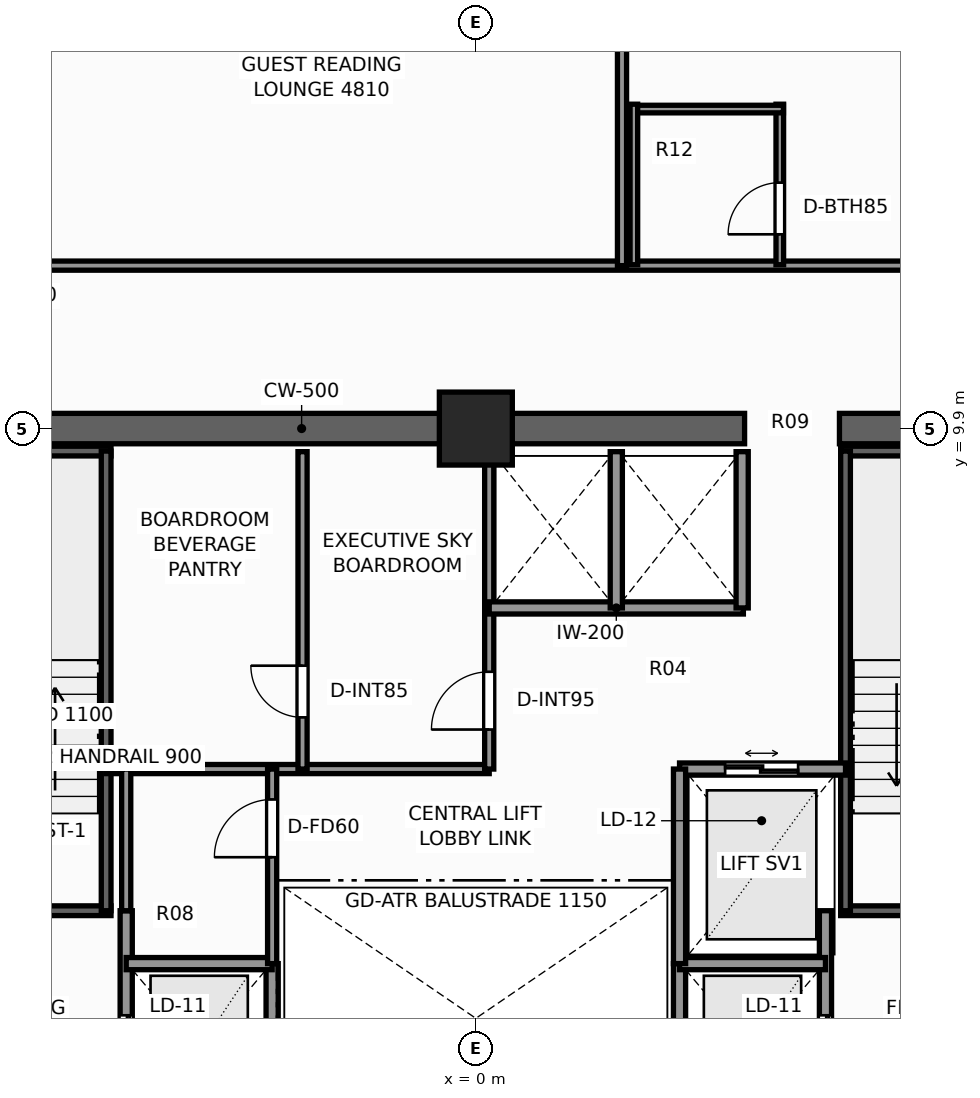
"""IFC4 building model, lengths in metres.
Left out: names, types, materials, properties, quantities, classifications, styles, units other than length and angle.
Written with IfcOpenShell. Run it as: python <this file> out.ifc"""

import sys

from ifc_helpers import new_model, si_unit, direction, frame, frame_2d, origin, origin_2d, place, context, subcontext, project, spatial, rectangle, extrude, element, fill, save


model = new_model("IFC4")
c1 = context("Model", 3, precision=1e-05, world=origin(), true_north=direction((0.0, 1.0)))
c2 = subcontext(c1, "Body", "Model", "MODEL_VIEW")
j1 = project(units=[si_unit("LENGTHUNIT", "METRE"), si_unit("PLANEANGLEUNIT", "RADIAN")], contexts=[c1])
p1 = place(None, origin())
s1 = spatial("IfcSite", under=j1, at=p1, CompositionType="ELEMENT")
p2 = place(p1, origin())
s2 = spatial("IfcBuilding", under=s1, at=p2, CompositionType="ELEMENT")
p3 = place(p2, frame((0.0, 0.0, 166.8)))
s3 = spatial("IfcBuildingStorey", under=s2, at=p3, CompositionType="ELEMENT", Elevation=166.8)
p4 = place(p3, frame((-10.15, 9.9, 0.0), z_axis=(0.0, 0.0, 1.0), x_axis=(1.0, 0.0, 0.0)))
e1 = element("IfcWall", 1, at=p4, inside=s3, PredefinedType="SHEAR", context=c2, shape_type="SweptSolid", body=[
    extrude(rectangle(XDim=14.57, YDim=0.5, at=frame_2d((7.285, 0.0))), origin(), (0.0, 0.0, 1.0), 3.3),
])
p5 = place(p3, frame((5.98, 9.9, 0.0), z_axis=(0.0, 0.0, 1.0), x_axis=(1.0, 0.0, 0.0)))
e2 = element("IfcWall", 2, at=p5, inside=s3, PredefinedType="SHEAR", context=c2, shape_type="SweptSolid", body=[
    extrude(rectangle(XDim=4.17, YDim=0.5, at=frame_2d((2.085, 0.0))), origin(), (0.0, 0.0, 1.0), 3.3),
])
p6 = place(p3, frame((0.0, 9.9, 0.0), z_axis=(0.0, 0.0, 1.0), x_axis=(1.0, 0.0, 0.0)))
e3 = element("IfcColumn", 3, at=p6, inside=s3, PredefinedType="COLUMN", context=c2, shape_type="SweptSolid", body=[
    extrude(rectangle(XDim=1.2, YDim=1.2, at=origin_2d()), origin(), (0.0, 0.0, 1.0), 3.3),
])
p7 = place(p3, frame((-9.52, 1.97, 0.0), z_axis=(0.0, 0.0, 1.0), x_axis=(1.0, 0.0, 0.0)))
e4 = element("IfcWall", 4, at=p7, inside=s3, PredefinedType="SHEAR", context=c2, shape_type="SweptSolid", body=[
    extrude(rectangle(XDim=3.52, YDim=0.16, at=frame_2d((1.76, 0.0))), origin(), (0.0, 0.0, 1.0), 3.3),
])
p8 = place(p7, frame((1.15, 0.0, 0.0)))
e5 = element("IfcOpeningElement", 5, at=p8, cuts=e4, PredefinedType="OPENING", context=c2, shape_type="SweptSolid", body=[
    extrude(rectangle(XDim=1.1, YDim=2.2, at=frame_2d((0.55, 1.1))), frame((0.0, 0.09, 0.0), z_axis=(0.0, -1.0, 0.0), x_axis=(1.0, 0.0, 0.0)), (0.0, 0.0, 1.0), 0.18),
])
p9 = place(p3, frame((-9.52, 9.53, 0.0), z_axis=(0.0, 0.0, 1.0), x_axis=(1.0, 0.0, 0.0)))
e6 = element("IfcWall", 6, at=p9, inside=s3, PredefinedType="SHEAR", context=c2, shape_type="SweptSolid", body=[
    extrude(rectangle(XDim=3.52, YDim=0.16, at=frame_2d((1.76, 0.0))), origin(), (0.0, 0.0, 1.0), 3.3),
])
p10 = place(p3, frame((-6.08, 1.97, 0.0), z_axis=(0.0, 0.0, 1.0), x_axis=(0.0, 1.0, 0.0)))
e7 = element("IfcWall", 7, at=p10, inside=s3, PredefinedType="SHEAR", context=c2, shape_type="SweptSolid", body=[
    extrude(rectangle(XDim=7.56, YDim=0.16, at=frame_2d((3.78, 0.0))), origin(), (0.0, 0.0, 1.0), 3.3),
])
p11 = place(p3, frame((6.0, 1.97, 0.0), z_axis=(0.0, 0.0, 1.0), x_axis=(1.0, 0.0, 0.0)))
e8 = element("IfcWall", 8, at=p11, inside=s3, PredefinedType="SHEAR", context=c2, shape_type="SweptSolid", body=[
    extrude(rectangle(XDim=3.52, YDim=0.16, at=frame_2d((1.76, 0.0))), origin(), (0.0, 0.0, 1.0), 3.3),
])
p12 = place(p11, frame((1.15, 0.0, 0.0)))
e9 = element("IfcOpeningElement", 9, at=p12, cuts=e8, PredefinedType="OPENING", context=c2, shape_type="SweptSolid", body=[
    extrude(rectangle(XDim=1.1, YDim=2.2, at=frame_2d((0.55, 1.1))), frame((0.0, 0.09, 0.0), z_axis=(0.0, -1.0, 0.0), x_axis=(1.0, 0.0, 0.0)), (0.0, 0.0, 1.0), 0.18),
])
p13 = place(p3, frame((6.0, 9.53, 0.0), z_axis=(0.0, 0.0, 1.0), x_axis=(1.0, 0.0, 0.0)))
e10 = element("IfcWall", 10, at=p13, inside=s3, PredefinedType="SHEAR", context=c2, shape_type="SweptSolid", body=[
    extrude(rectangle(XDim=3.52, YDim=0.16, at=frame_2d((1.76, 0.0))), origin(), (0.0, 0.0, 1.0), 3.3),
])
p14 = place(p3, frame((6.08, 1.97, 0.0), z_axis=(0.0, 0.0, 1.0), x_axis=(0.0, 1.0, 0.0)))
e11 = element("IfcWall", 11, at=p14, inside=s3, PredefinedType="SHEAR", context=c2, shape_type="SweptSolid", body=[
    extrude(rectangle(XDim=7.56, YDim=0.16, at=frame_2d((3.78, 0.0))), origin(), (0.0, 0.0, 1.0), 3.3),
])
p15 = place(p3, frame((-5.75, -3.6, 0.0), z_axis=(0.0, 0.0, 1.0), x_axis=(0.0, 1.0, 0.0)))
e12 = element("IfcWall", 12, at=p15, inside=s3, PredefinedType="SOLIDWALL", context=c2, shape_type="SweptSolid", body=[
    extrude(rectangle(XDim=5.57, YDim=0.2, at=frame_2d((2.785, 0.0))), origin(), (0.0, 0.0, 1.0), 2.735),
])
p16 = place(p15, frame((2.75, 0.0, 0.0)))
e13 = element("IfcOpeningElement", 13, at=p16, cuts=e12, PredefinedType="OPENING", context=c2, shape_type="SweptSolid", body=[
    extrude(rectangle(XDim=1.1, YDim=2.2, at=frame_2d((0.55, 1.1))), frame((0.0, 0.11, 0.0), z_axis=(0.0, -1.0, 0.0), x_axis=(1.0, 0.0, 0.0)), (0.0, 0.0, 1.0), 0.22),
])
p17 = place(p3, frame((-3.35, -1.7, 0.0), z_axis=(0.0, 0.0, 1.0), x_axis=(0.0, 1.0, 0.0)))
e14 = element("IfcWall", 14, at=p17, inside=s3, PredefinedType="SOLIDWALL", context=c2, shape_type="SweptSolid", body=[
    extrude(rectangle(XDim=2.8, YDim=0.2, at=frame_2d((1.4, 0.0))), origin(), (0.0, 0.0, 1.0), 2.735),
])
p18 = place(p3, frame((-5.75, 1.1, 0.0), z_axis=(0.0, 0.0, 1.0), x_axis=(1.0, 0.0, 0.0)))
e15 = element("IfcWall", 15, at=p18, inside=s3, PredefinedType="SOLIDWALL", context=c2, shape_type="SweptSolid", body=[
    extrude(rectangle(XDim=2.4, YDim=0.2, at=frame_2d((1.2, 0.0))), origin(), (0.0, 0.0, 1.0), 3.1),
])
p19 = place(p3, frame((5.75, -3.6, 0.0), z_axis=(0.0, 0.0, 1.0), x_axis=(0.0, 1.0, 0.0)))
e16 = element("IfcWall", 16, at=p19, inside=s3, PredefinedType="SOLIDWALL", context=c2, shape_type="SweptSolid", body=[
    extrude(rectangle(XDim=5.57, YDim=0.2, at=frame_2d((2.785, 0.0))), origin(), (0.0, 0.0, 1.0), 2.735),
])
p20 = place(p19, frame((2.75, 0.0, 0.0)))
e17 = element("IfcOpeningElement", 17, at=p20, cuts=e16, PredefinedType="OPENING", context=c2, shape_type="SweptSolid", body=[
    extrude(rectangle(XDim=1.1, YDim=2.2, at=frame_2d((0.55, 1.1))), frame((0.0, 0.11, 0.0), z_axis=(0.0, -1.0, 0.0), x_axis=(1.0, 0.0, 0.0)), (0.0, 0.0, 1.0), 0.22),
])
p21 = place(p3, frame((3.35, -1.7, 0.0), z_axis=(0.0, 0.0, 1.0), x_axis=(0.0, 1.0, 0.0)))
e18 = element("IfcWall", 18, at=p21, inside=s3, PredefinedType="SOLIDWALL", context=c2, shape_type="SweptSolid", body=[
    extrude(rectangle(XDim=2.8, YDim=0.2, at=frame_2d((1.4, 0.0))), origin(), (0.0, 0.0, 1.0), 2.735),
])
p22 = place(p3, frame((3.35, 1.1, 0.0), z_axis=(0.0, 0.0, 1.0), x_axis=(1.0, 0.0, 0.0)))
e19 = element("IfcWall", 19, at=p22, inside=s3, PredefinedType="SOLIDWALL", context=c2, shape_type="SweptSolid", body=[
    extrude(rectangle(XDim=2.4, YDim=0.2, at=frame_2d((1.2, 0.0))), origin(), (0.0, 0.0, 1.0), 3.1),
])
p23 = place(p3, frame((3.35, 4.3, 0.0), z_axis=(0.0, 0.0, 1.0), x_axis=(1.0, 0.0, 0.0)))
e20 = element("IfcWall", 20, at=p23, inside=s3, PredefinedType="SOLIDWALL", context=c2, shape_type="SweptSolid", body=[
    extrude(rectangle(XDim=2.73, YDim=0.2, at=frame_2d((1.365, 0.0))), origin(), (0.0, 0.0, 1.0), 3.1),
])
p24 = place(p23, frame((0.75, 0.0, 0.0)))
e21 = element("IfcOpeningElement", 21, at=p24, cuts=e20, PredefinedType="OPENING", context=c2, shape_type="SweptSolid", body=[
    extrude(rectangle(XDim=1.2, YDim=2.25, at=frame_2d((0.6, 1.125))), frame((0.0, 0.11, 0.0), z_axis=(0.0, -1.0, 0.0), x_axis=(1.0, 0.0, 0.0)), (0.0, 0.0, 1.0), 0.22),
])
p25 = place(p3, frame((3.35, 1.1, 0.0), z_axis=(0.0, 0.0, 1.0), x_axis=(0.0, 1.0, 0.0)))
e22 = element("IfcWall", 22, at=p25, inside=s3, PredefinedType="SOLIDWALL", context=c2, shape_type="SweptSolid", body=[
    extrude(rectangle(XDim=3.2, YDim=0.2, at=frame_2d((1.6, 0.0))), origin(), (0.0, 0.0, 1.0), 2.735),
])
p26 = place(p3, frame((-6.08, 4.3, 0.0), z_axis=(0.0, 0.0, 1.0), x_axis=(1.0, 0.0, 0.0)))
e23 = element("IfcWall", 23, at=p26, inside=s3, PredefinedType="PARTITIONING", context=c2, shape_type="SweptSolid", body=[
    extrude(rectangle(XDim=6.3, YDim=0.15, at=frame_2d((3.15, 0.0))), origin(), (0.0, 0.0, 1.0), 3.1),
])
p27 = place(p3, frame((0.22, 4.3, 0.0), z_axis=(0.0, 0.0, 1.0), x_axis=(0.0, 1.0, 0.0)))
e24 = element("IfcWall", 24, at=p27, inside=s3, PredefinedType="PARTITIONING", context=c2, shape_type="SweptSolid", body=[
    extrude(rectangle(XDim=5.22, YDim=0.15, at=frame_2d((2.61, 0.0))), origin(), (0.0, 0.0, 1.0), 3.1),
])
p28 = place(p27, frame((0.65, 0.0, 0.0)))
e25 = element("IfcOpeningElement", 25, at=p28, cuts=e24, PredefinedType="OPENING", context=c2, shape_type="SweptSolid", body=[
    extrude(rectangle(XDim=0.95, YDim=2.06, at=frame_2d((0.475, 1.03))), frame((0.0, 0.085, 0.0), z_axis=(0.0, -1.0, 0.0), x_axis=(1.0, 0.0, 0.0)), (0.0, 0.0, 1.0), 0.17),
])
p29 = place(p3, frame((-2.85, 4.3, 0.0), z_axis=(0.0, 0.0, 1.0), x_axis=(0.0, 1.0, 0.0)))
e26 = element("IfcWall", 26, at=p29, inside=s3, PredefinedType="PARTITIONING", context=c2, shape_type="SweptSolid", body=[
    extrude(rectangle(XDim=5.22, YDim=0.15, at=frame_2d((2.61, 0.0))), origin(), (0.0, 0.0, 1.0), 3.1),
])
p30 = place(p29, frame((0.85, 0.0, 0.0)))
e27 = element("IfcOpeningElement", 27, at=p30, cuts=e26, PredefinedType="OPENING", context=c2, shape_type="SweptSolid", body=[
    extrude(rectangle(XDim=0.85, YDim=2.03, at=frame_2d((0.425, 1.015))), frame((0.0, 0.085, 0.0), z_axis=(0.0, -1.0, 0.0), x_axis=(1.0, 0.0, 0.0)), (0.0, 0.0, 1.0), 0.17),
])
p31 = place(p3, frame((0.22, 6.95, 0.0), z_axis=(0.0, 0.0, 1.0), x_axis=(1.0, 0.0, 0.0)))
e28 = element("IfcWall", 28, at=p31, inside=s3, PredefinedType="SOLIDWALL", context=c2, shape_type="SweptSolid", body=[
    extrude(rectangle(XDim=4.18, YDim=0.2, at=frame_2d((2.09, 0.0))), origin(), (0.0, 0.0, 1.0), 3.1),
])
for number, where, z_axis, x_axis in (
    (29, (4.38, 6.95, 0.0), (0.0, 0.0, 1.0), (0.0, 1.0, 0.0)),
    (30, (2.31, 6.95, 0.0), (0.0, 0.0, 1.0), (0.0, 1.0, 0.0)),
):
    element("IfcWall", number, at=place(p3, frame(where, z_axis=z_axis, x_axis=x_axis)), inside=s3, PredefinedType="SOLIDWALL", context=c2, shape_type="SweptSolid", body=[
        extrude(rectangle(XDim=2.57, YDim=0.2, at=frame_2d((1.285, 0.0))), origin(), (0.0, 0.0, 1.0), 3.1),
    ])
p32 = place(p3, frame((-3.35, 1.1, 0.0), z_axis=(0.0, 0.0, 1.0), x_axis=(0.0, 1.0, 0.0)))
e31 = element("IfcWall", 31, at=p32, inside=s3, PredefinedType="PARTITIONING", context=c2, shape_type="SweptSolid", body=[
    extrude(rectangle(XDim=3.2, YDim=0.15, at=frame_2d((1.6, 0.0))), origin(), (0.0, 0.0, 1.0), 2.735),
])
p33 = place(p32, frame((1.75, 0.0, 0.0)))
e32 = element("IfcOpeningElement", 32, at=p33, cuts=e31, PredefinedType="OPENING", context=c2, shape_type="SweptSolid", body=[
    extrude(rectangle(XDim=0.95, YDim=2.06, at=frame_2d((0.475, 1.03))), frame((0.0, 0.085, 0.0), z_axis=(0.0, -1.0, 0.0), x_axis=(1.0, 0.0, 0.0)), (0.0, 0.0, 1.0), 0.17),
])
p34 = place(p3, frame((-5.75, 1.97, 0.0), z_axis=(0.0, 0.0, 1.0), x_axis=(0.0, 1.0, 0.0)))
e33 = element("IfcWall", 33, at=p34, inside=s3, PredefinedType="PARTITIONING", context=c2, shape_type="SweptSolid", body=[
    extrude(rectangle(XDim=2.33, YDim=0.15, at=frame_2d((1.165, 0.0))), origin(), (0.0, 0.0, 1.0), 2.735),
])
p35 = place(p3, frame((-12.58, 12.58, 0.0), z_axis=(0.0, 0.0, 1.0), x_axis=(1.0, 0.0, 0.0)))
e34 = element("IfcWall", 34, at=p35, inside=s3, PredefinedType="PARTITIONING", context=c2, shape_type="SweptSolid", body=[
    extrude(rectangle(XDim=25.0, YDim=0.15, at=frame_2d((12.5, 0.0))), origin(), (0.0, 0.0, 1.0), 2.389),
])
p36 = place(p35, frame((4.595, 0.0, 0.0)))
e35 = element("IfcOpeningElement", 35, at=p36, cuts=e34, PredefinedType="OPENING", context=c2, shape_type="SweptSolid", body=[
    extrude(rectangle(XDim=0.9, YDim=2.06, at=frame_2d((0.45, 1.03))), frame((0.0, 0.085, 0.0), z_axis=(0.0, -1.0, 0.0), x_axis=(1.0, 0.0, 0.0)), (0.0, 0.0, 1.0), 0.17),
])
p37 = place(p35, frame((19.64, 0.0, 0.0)))
e36 = element("IfcOpeningElement", 36, at=p37, cuts=e34, PredefinedType="OPENING", context=c2, shape_type="SweptSolid", body=[
    extrude(rectangle(XDim=0.95, YDim=2.06, at=frame_2d((0.475, 1.03))), frame((0.0, 0.085, 0.0), z_axis=(0.0, -1.0, 0.0), x_axis=(1.0, 0.0, 0.0)), (0.0, 0.0, 1.0), 0.17),
])
p38 = place(p3, frame((2.404, 12.58, 0.0), z_axis=(0.0, 0.0, 1.0), x_axis=(0.0, 1.0, 0.0)))
e37 = element("IfcWall", 37, at=p38, inside=s3, PredefinedType="PARTITIONING", context=c2, shape_type="SweptSolid", body=[
    extrude(rectangle(XDim=6.5, YDim=0.15, at=frame_2d((3.25, 0.0))), origin(), (0.0, 0.0, 1.0), 2.473),
])
p39 = place(p3, frame((4.999, 12.595, 0.0), z_axis=(0.0, 0.0, 1.0), x_axis=(0.0, 1.0, 0.0)))
e38 = element("IfcWall", 38, at=p39, inside=s3, PredefinedType="PARTITIONING", context=c2, shape_type="SweptSolid", body=[
    extrude(rectangle(XDim=2.64, YDim=0.125, at=frame_2d((1.32, 0.0))), origin(), (0.0, 0.0, 1.0), 3.1),
])
p40 = place(p39, frame((0.5, 0.0, 0.0)))
e39 = element("IfcOpeningElement", 39, at=p40, cuts=e38, PredefinedType="OPENING", context=c2, shape_type="SweptSolid", body=[
    extrude(rectangle(XDim=0.85, YDim=2.03, at=frame_2d((0.425, 1.015))), frame((0.0, 0.073, 0.0), z_axis=(0.0, -1.0, 0.0), x_axis=(1.0, 0.0, 0.0)), (0.0, 0.0, 1.0), 0.145),
])
p41 = place(p3, frame((2.539, 15.155, 0.0), z_axis=(0.0, 0.0, 1.0), x_axis=(1.0, 0.0, 0.0)))
e40 = element("IfcWall", 40, at=p41, inside=s3, PredefinedType="PARTITIONING", context=c2, shape_type="SweptSolid", body=[
    extrude(rectangle(XDim=2.52, YDim=0.125, at=frame_2d((1.26, 0.0))), origin(), (0.0, 0.0, 1.0), 2.389),
])
p42 = place(p3, frame((2.599, 12.595, 0.0), z_axis=(0.0, 0.0, 1.0), x_axis=(0.0, 1.0, 0.0)))
e41 = element("IfcWall", 41, at=p42, inside=s3, PredefinedType="PARTITIONING", context=c2, shape_type="SweptSolid", body=[
    extrude(rectangle(XDim=2.64, YDim=0.125, at=frame_2d((1.32, 0.0))), origin(), (0.0, 0.0, 1.0), 3.1),
])
p43 = place(p16, origin())
e42 = element("IfcDoor", 42, at=p43, inside=s3, OperationType="DOUBLE_DOOR_SLIDING", PredefinedType="DOOR", context=c2, shape_type="SweptSolid", body=[
    extrude(rectangle(XDim=1.1, YDim=2.2, at=frame_2d((0.55, 1.1))), frame((0.0, 0.025, 0.0), z_axis=(0.0, -1.0, 0.0), x_axis=(1.0, 0.0, 0.0)), (0.0, 0.0, 1.0), 0.05),
])
fill(e13, e42)
p44 = place(p20, origin())
e43 = element("IfcDoor", 43, at=p44, inside=s3, OperationType="DOUBLE_DOOR_SLIDING", PredefinedType="DOOR", context=c2, shape_type="SweptSolid", body=[
    extrude(rectangle(XDim=1.1, YDim=2.2, at=frame_2d((0.55, 1.1))), frame((0.0, 0.025, 0.0), z_axis=(0.0, -1.0, 0.0), x_axis=(1.0, 0.0, 0.0)), (0.0, 0.0, 1.0), 0.05),
])
fill(e17, e43)
p45 = place(p24, origin())
e44 = element("IfcDoor", 44, at=p45, inside=s3, OperationType="DOUBLE_DOOR_SLIDING", PredefinedType="DOOR", context=c2, shape_type="SweptSolid", body=[
    extrude(rectangle(XDim=1.2, YDim=2.25, at=frame_2d((0.6, 1.125))), frame((0.0, 0.025, 0.0), z_axis=(0.0, -1.0, 0.0), x_axis=(1.0, 0.0, 0.0)), (0.0, 0.0, 1.0), 0.05),
])
fill(e21, e44)
p46 = place(p28, origin())
e45 = element("IfcDoor", 45, at=p46, inside=s3, OperationType="SINGLE_SWING_LEFT", PredefinedType="DOOR", context=c2, shape_type="SweptSolid", body=[
    extrude(rectangle(XDim=0.95, YDim=2.06, at=frame_2d((0.475, 1.03))), frame((0.0, 0.025, 0.0), z_axis=(0.0, -1.0, 0.0), x_axis=(1.0, 0.0, 0.0)), (0.0, 0.0, 1.0), 0.05),
])
fill(e25, e45)
p47 = place(p30, origin())
e46 = element("IfcDoor", 46, at=p47, inside=s3, OperationType="SINGLE_SWING_RIGHT", PredefinedType="DOOR", context=c2, shape_type="SweptSolid", body=[
    extrude(rectangle(XDim=0.85, YDim=2.03, at=frame_2d((0.425, 1.015))), frame((0.0, 0.025, 0.0), z_axis=(0.0, -1.0, 0.0), x_axis=(1.0, 0.0, 0.0)), (0.0, 0.0, 1.0), 0.05),
])
fill(e27, e46)
p48 = place(p33, origin())
e47 = element("IfcDoor", 47, at=p48, inside=s3, OperationType="SINGLE_SWING_LEFT", PredefinedType="DOOR", context=c2, shape_type="SweptSolid", body=[
    extrude(rectangle(XDim=0.95, YDim=2.06, at=frame_2d((0.475, 1.03))), frame((0.0, 0.025, 0.0), z_axis=(0.0, -1.0, 0.0), x_axis=(1.0, 0.0, 0.0)), (0.0, 0.0, 1.0), 0.05),
])
fill(e32, e47)
p49 = place(p40, origin())
e48 = element("IfcDoor", 48, at=p49, inside=s3, OperationType="SINGLE_SWING_LEFT", PredefinedType="DOOR", context=c2, shape_type="SweptSolid", body=[
    extrude(rectangle(XDim=0.85, YDim=2.03, at=frame_2d((0.425, 1.015))), frame((0.0, 0.025, 0.0), z_axis=(0.0, -1.0, 0.0), x_axis=(1.0, 0.0, 0.0)), (0.0, 0.0, 1.0), 0.05),
])
fill(e39, e48)
save(model, sys.argv[1])
